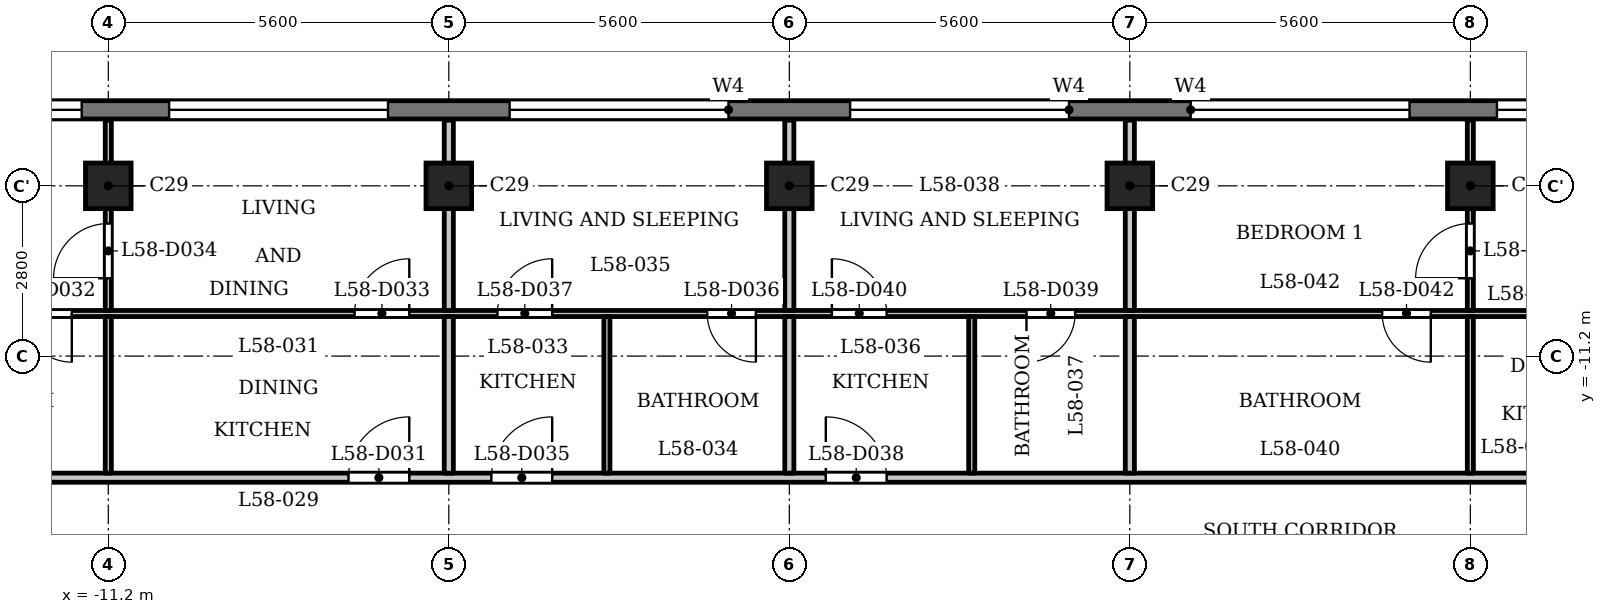
"""IFC4 building model, lengths in metres.
Left out: names, types, materials, properties, quantities, classifications, styles, units other than length and angle.
Written with IfcOpenShell. Run it as: python <this file> out.ifc"""

import sys

from ifc_helpers import new_model, si_unit, direction, frame, frame_2d, origin, origin_2d, place, context, subcontext, project, spatial, rectangle, extrude, element, fill, save


model = new_model("IFC4")
c1 = context("Model", 3, precision=1e-05, world=origin(), true_north=direction((0.0, 1.0)))
c2 = subcontext(c1, "Body", "Model", "MODEL_VIEW")
j1 = project(units=[si_unit("LENGTHUNIT", "METRE"), si_unit("PLANEANGLEUNIT", "RADIAN")], contexts=[c1])
p1 = place(None, origin())
s1 = spatial("IfcSite", under=j1, at=p1, CompositionType="ELEMENT")
p2 = place(p1, origin())
s2 = spatial("IfcBuilding", under=s1, at=p2, CompositionType="ELEMENT")
p3 = place(p2, frame((0.0, 0.0, 223.9)))
s3 = spatial("IfcBuildingStorey", under=s2, at=p3, CompositionType="ELEMENT", Elevation=223.9)
for number, where, z_axis, x_axis in (
    (1, (-11.2, -8.4, 0.0), (0.0, 0.0, 1.0), (1.0, 0.0, 0.0)),
    (2, (-5.6, -8.4, 0.0), (0.0, 0.0, 1.0), (1.0, 0.0, 0.0)),
    (3, (0.0, -8.4, 0.0), (0.0, 0.0, 1.0), (1.0, 0.0, 0.0)),
    (4, (5.6, -8.4, 0.0), (0.0, 0.0, 1.0), (1.0, 0.0, 0.0)),
    (5, (11.2, -8.4, 0.0), (0.0, 0.0, 1.0), (1.0, 0.0, 0.0)),
):
    element("IfcColumn", number, at=place(p3, frame(where, z_axis=z_axis, x_axis=x_axis)), inside=s3, PredefinedType="COLUMN", context=c2, shape_type="SweptSolid", body=[
        extrude(rectangle(XDim=0.75, YDim=0.75, at=origin_2d()), origin(), (0.0, 0.0, 1.0), 3.5),
    ])
p4 = place(p3, frame((13.8, -7.15, 0.0), z_axis=(0.0, 0.0, 1.0), x_axis=(-1.0, 0.0, 0.0)))
e6 = element("IfcWall", 6, at=p4, inside=s3, PredefinedType="SOLIDWALL", context=c2, shape_type="SweptSolid", body=[
    extrude(rectangle(XDim=27.6, YDim=0.3, at=frame_2d((13.8, 0.0))), origin(), (0.0, 0.0, 1.0), 3.2),
])
p5 = place(p4, frame((0.363, 0.0, 0.9)))
e7 = element("IfcOpeningElement", 7, at=p5, cuts=e6, PredefinedType="OPENING", context=c2, shape_type="SweptSolid", body=[
    extrude(rectangle(XDim=1.8, YDim=1.25, at=frame_2d((0.9, 0.625))), frame((0.0, 0.16, 0.0), z_axis=(0.0, -1.0, 0.0), x_axis=(1.0, 0.0, 0.0)), (0.0, 0.0, 1.0), 0.32),
])
p6 = place(p4, frame((3.6, 0.0, 1.2)))
e8 = element("IfcOpeningElement", 8, at=p6, cuts=e6, PredefinedType="OPENING", context=c2, shape_type="SweptSolid", body=[
    extrude(rectangle(XDim=3.6, YDim=0.95, at=frame_2d((1.8, 0.475))), frame((0.0, 0.16, 0.0), z_axis=(0.0, -1.0, 0.0), x_axis=(1.0, 0.0, 0.0)), (0.0, 0.0, 1.0), 0.32),
])
p7 = place(p4, frame((9.2, 0.0, 1.2)))
e9 = element("IfcOpeningElement", 9, at=p7, cuts=e6, PredefinedType="OPENING", context=c2, shape_type="SweptSolid", body=[
    extrude(rectangle(XDim=3.6, YDim=0.95, at=frame_2d((1.8, 0.475))), frame((0.0, 0.16, 0.0), z_axis=(0.0, -1.0, 0.0), x_axis=(1.0, 0.0, 0.0)), (0.0, 0.0, 1.0), 0.32),
])
p8 = place(p4, frame((14.8, 0.0, 1.2)))
e10 = element("IfcOpeningElement", 10, at=p8, cuts=e6, PredefinedType="OPENING", context=c2, shape_type="SweptSolid", body=[
    extrude(rectangle(XDim=3.6, YDim=0.95, at=frame_2d((1.8, 0.475))), frame((0.0, 0.16, 0.0), z_axis=(0.0, -1.0, 0.0), x_axis=(1.0, 0.0, 0.0)), (0.0, 0.0, 1.0), 0.32),
])
p9 = place(p4, frame((20.4, 0.0, 1.2)))
e11 = element("IfcOpeningElement", 11, at=p9, cuts=e6, PredefinedType="OPENING", context=c2, shape_type="SweptSolid", body=[
    extrude(rectangle(XDim=3.6, YDim=0.95, at=frame_2d((1.8, 0.475))), frame((0.0, 0.16, 0.0), z_axis=(0.0, -1.0, 0.0), x_axis=(1.0, 0.0, 0.0)), (0.0, 0.0, 1.0), 0.32),
])
p10 = place(p4, frame((25.438, 0.0, 0.9)))
e12 = element("IfcOpeningElement", 12, at=p10, cuts=e6, PredefinedType="OPENING", context=c2, shape_type="SweptSolid", body=[
    extrude(rectangle(XDim=1.8, YDim=1.25, at=frame_2d((0.9, 0.625))), frame((0.0, 0.16, 0.0), z_axis=(0.0, -1.0, 0.0), x_axis=(1.0, 0.0, 0.0)), (0.0, 0.0, 1.0), 0.32),
])
p11 = place(p3, frame((-17.4, -13.2, 0.0), z_axis=(0.0, 0.0, 1.0), x_axis=(1.0, 0.0, 0.0)))
e13 = element("IfcWall", 13, at=p11, inside=s3, PredefinedType="PARTITIONING", context=c2, shape_type="SweptSolid", body=[
    extrude(rectangle(XDim=34.8, YDim=0.15, at=frame_2d((17.4, 0.0))), origin(), (0.0, 0.0, 1.0), 3.2),
])
p12 = place(p11, frame((0.65, 0.0, 0.0)))
e14 = element("IfcOpeningElement", 14, at=p12, cuts=e13, PredefinedType="OPENING", context=c2, shape_type="SweptSolid", body=[
    extrude(rectangle(XDim=1.0, YDim=2.1, at=frame_2d((0.5, 1.05))), frame((0.0, 0.085, 0.0), z_axis=(0.0, -1.0, 0.0), x_axis=(1.0, 0.0, 0.0)), (0.0, 0.0, 1.0), 0.17),
])
p13 = place(p11, frame((33.05, 0.0, 0.0)))
e15 = element("IfcOpeningElement", 15, at=p13, cuts=e13, PredefinedType="OPENING", context=c2, shape_type="SweptSolid", body=[
    extrude(rectangle(XDim=1.0, YDim=2.1, at=frame_2d((0.5, 1.05))), frame((0.0, 0.085, 0.0), z_axis=(0.0, -1.0, 0.0), x_axis=(1.0, 0.0, 0.0)), (0.0, 0.0, 1.0), 0.17),
])
p14 = place(p11, frame((10.15, 0.0, 0.0)))
e16 = element("IfcOpeningElement", 16, at=p14, cuts=e13, PredefinedType="OPENING", context=c2, shape_type="SweptSolid", body=[
    extrude(rectangle(XDim=1.0, YDim=2.1, at=frame_2d((0.5, 1.05))), frame((0.0, 0.085, 0.0), z_axis=(0.0, -1.0, 0.0), x_axis=(1.0, 0.0, 0.0)), (0.0, 0.0, 1.0), 0.17),
])
p15 = place(p11, frame((12.5, 0.0, 0.0)))
e17 = element("IfcOpeningElement", 17, at=p15, cuts=e13, PredefinedType="OPENING", context=c2, shape_type="SweptSolid", body=[
    extrude(rectangle(XDim=1.0, YDim=2.1, at=frame_2d((0.5, 1.05))), frame((0.0, 0.085, 0.0), z_axis=(0.0, -1.0, 0.0), x_axis=(1.0, 0.0, 0.0)), (0.0, 0.0, 1.0), 0.17),
])
p16 = place(p11, frame((18.0, 0.0, 0.0)))
e18 = element("IfcOpeningElement", 18, at=p16, cuts=e13, PredefinedType="OPENING", context=c2, shape_type="SweptSolid", body=[
    extrude(rectangle(XDim=1.0, YDim=2.1, at=frame_2d((0.5, 1.05))), frame((0.0, 0.085, 0.0), z_axis=(0.0, -1.0, 0.0), x_axis=(1.0, 0.0, 0.0)), (0.0, 0.0, 1.0), 0.17),
])
p17 = place(p11, frame((30.75, 0.0, 0.0)))
e19 = element("IfcOpeningElement", 19, at=p17, cuts=e13, PredefinedType="OPENING", context=c2, shape_type="SweptSolid", body=[
    extrude(rectangle(XDim=1.0, YDim=2.1, at=frame_2d((0.5, 1.05))), frame((0.0, 0.085, 0.0), z_axis=(0.0, -1.0, 0.0), x_axis=(1.0, 0.0, 0.0)), (0.0, 0.0, 1.0), 0.17),
])
p18 = place(p3, frame((-14.925, -10.5, 0.0), z_axis=(0.0, 0.0, 1.0), x_axis=(1.0, 0.0, 0.0)))
e20 = element("IfcWall", 20, at=p18, inside=s3, PredefinedType="PARTITIONING", context=c2, shape_type="SweptSolid", body=[
    extrude(rectangle(XDim=29.85, YDim=0.1, at=frame_2d((14.925, 0.0))), origin(), (0.0, 0.0, 1.0), 3.2),
])
p19 = place(p18, frame((2.325, 0.0, 0.0)))
e21 = element("IfcOpeningElement", 21, at=p19, cuts=e20, PredefinedType="OPENING", context=c2, shape_type="SweptSolid", body=[
    extrude(rectangle(XDim=0.8, YDim=2.1, at=frame_2d((0.4, 1.05))), frame((0.0, 0.06, 0.0), z_axis=(0.0, -1.0, 0.0), x_axis=(1.0, 0.0, 0.0)), (0.0, 0.0, 1.0), 0.12),
])
p20 = place(p18, frame((7.775, 0.0, 0.0)))
e22 = element("IfcOpeningElement", 22, at=p20, cuts=e20, PredefinedType="OPENING", context=c2, shape_type="SweptSolid", body=[
    extrude(rectangle(XDim=0.9, YDim=2.1, at=frame_2d((0.45, 1.05))), frame((0.0, 0.06, 0.0), z_axis=(0.0, -1.0, 0.0), x_axis=(1.0, 0.0, 0.0)), (0.0, 0.0, 1.0), 0.12),
])
p21 = place(p18, frame((13.575, 0.0, 0.0)))
e23 = element("IfcOpeningElement", 23, at=p21, cuts=e20, PredefinedType="OPENING", context=c2, shape_type="SweptSolid", body=[
    extrude(rectangle(XDim=0.8, YDim=2.1, at=frame_2d((0.4, 1.05))), frame((0.0, 0.06, 0.0), z_axis=(0.0, -1.0, 0.0), x_axis=(1.0, 0.0, 0.0)), (0.0, 0.0, 1.0), 0.12),
])
p22 = place(p18, frame((10.125, 0.0, 0.0)))
e24 = element("IfcOpeningElement", 24, at=p22, cuts=e20, PredefinedType="OPENING", context=c2, shape_type="SweptSolid", body=[
    extrude(rectangle(XDim=0.9, YDim=2.1, at=frame_2d((0.45, 1.05))), frame((0.0, 0.06, 0.0), z_axis=(0.0, -1.0, 0.0), x_axis=(1.0, 0.0, 0.0)), (0.0, 0.0, 1.0), 0.12),
])
p23 = place(p18, frame((18.825, 0.0, 0.0)))
e25 = element("IfcOpeningElement", 25, at=p23, cuts=e20, PredefinedType="OPENING", context=c2, shape_type="SweptSolid", body=[
    extrude(rectangle(XDim=0.8, YDim=2.1, at=frame_2d((0.4, 1.05))), frame((0.0, 0.06, 0.0), z_axis=(0.0, -1.0, 0.0), x_axis=(1.0, 0.0, 0.0)), (0.0, 0.0, 1.0), 0.12),
])
p24 = place(p18, frame((15.625, 0.0, 0.0)))
e26 = element("IfcOpeningElement", 26, at=p24, cuts=e20, PredefinedType="OPENING", context=c2, shape_type="SweptSolid", body=[
    extrude(rectangle(XDim=0.9, YDim=2.1, at=frame_2d((0.45, 1.05))), frame((0.0, 0.06, 0.0), z_axis=(0.0, -1.0, 0.0), x_axis=(1.0, 0.0, 0.0)), (0.0, 0.0, 1.0), 0.12),
])
p25 = place(p18, frame((24.675, 0.0, 0.0)))
e27 = element("IfcOpeningElement", 27, at=p25, cuts=e20, PredefinedType="OPENING", context=c2, shape_type="SweptSolid", body=[
    extrude(rectangle(XDim=0.8, YDim=2.1, at=frame_2d((0.4, 1.05))), frame((0.0, 0.06, 0.0), z_axis=(0.0, -1.0, 0.0), x_axis=(1.0, 0.0, 0.0)), (0.0, 0.0, 1.0), 0.12),
])
p26 = place(p18, frame((28.375, 0.0, 0.0)))
e28 = element("IfcOpeningElement", 28, at=p26, cuts=e20, PredefinedType="OPENING", context=c2, shape_type="SweptSolid", body=[
    extrude(rectangle(XDim=0.9, YDim=2.1, at=frame_2d((0.45, 1.05))), frame((0.0, 0.06, 0.0), z_axis=(0.0, -1.0, 0.0), x_axis=(1.0, 0.0, 0.0)), (0.0, 0.0, 1.0), 0.12),
])
p27 = place(p3, frame((-11.2, -13.125, 0.0), z_axis=(0.0, 0.0, 1.0), x_axis=(0.0, 1.0, 0.0)))
e29 = element("IfcWall", 29, at=p27, inside=s3, PredefinedType="PARTITIONING", context=c2, shape_type="SweptSolid", body=[
    extrude(rectangle(XDim=2.575, YDim=0.1, at=frame_2d((1.288, 0.0))), origin(), (0.0, 0.0, 1.0), 3.2),
])
p28 = place(p3, frame((-11.2, -10.45, 0.0), z_axis=(0.0, 0.0, 1.0), x_axis=(0.0, 1.0, 0.0)))
e30 = element("IfcWall", 30, at=p28, inside=s3, PredefinedType="PARTITIONING", context=c2, shape_type="SweptSolid", body=[
    extrude(rectangle(XDim=3.13, YDim=0.1, at=frame_2d((1.565, 0.0))), origin(), (0.0, 0.0, 1.0), 3.2),
])
p29 = place(p28, frame((0.53, 0.0, 0.0)))
e31 = element("IfcOpeningElement", 31, at=p29, cuts=e30, PredefinedType="OPENING", context=c2, shape_type="SweptSolid", body=[
    extrude(rectangle(XDim=0.9, YDim=2.1, at=frame_2d((0.45, 1.05))), frame((0.0, 0.06, 0.0), z_axis=(0.0, -1.0, 0.0), x_axis=(1.0, 0.0, 0.0)), (0.0, 0.0, 1.0), 0.12),
])
p30 = place(p3, frame((-5.6, -13.125, 0.0), z_axis=(0.0, 0.0, 1.0), x_axis=(0.0, 1.0, 0.0)))
e32 = element("IfcWall", 32, at=p30, inside=s3, PredefinedType="PARTITIONING", context=c2, shape_type="SweptSolid", body=[
    extrude(rectangle(XDim=2.575, YDim=0.15, at=frame_2d((1.288, 0.0))), origin(), (0.0, 0.0, 1.0), 3.2),
])
p31 = place(p3, frame((-5.6, -10.45, 0.0), z_axis=(0.0, 0.0, 1.0), x_axis=(0.0, 1.0, 0.0)))
e33 = element("IfcWall", 33, at=p31, inside=s3, PredefinedType="PARTITIONING", context=c2, shape_type="SweptSolid", body=[
    extrude(rectangle(XDim=3.13, YDim=0.15, at=frame_2d((1.565, 0.0))), origin(), (0.0, 0.0, 1.0), 3.2),
])
p32 = place(p3, frame((-3.0, -13.125, 0.0), z_axis=(0.0, 0.0, 1.0), x_axis=(0.0, 1.0, 0.0)))
e34 = element("IfcWall", 34, at=p32, inside=s3, PredefinedType="PARTITIONING", context=c2, shape_type="SweptSolid", body=[
    extrude(rectangle(XDim=2.575, YDim=0.1, at=frame_2d((1.288, 0.0))), origin(), (0.0, 0.0, 1.0), 3.2),
])
p33 = place(p3, frame((0.0, -13.125, 0.0), z_axis=(0.0, 0.0, 1.0), x_axis=(0.0, 1.0, 0.0)))
e35 = element("IfcWall", 35, at=p33, inside=s3, PredefinedType="PARTITIONING", context=c2, shape_type="SweptSolid", body=[
    extrude(rectangle(XDim=2.575, YDim=0.15, at=frame_2d((1.288, 0.0))), origin(), (0.0, 0.0, 1.0), 3.2),
])
p34 = place(p3, frame((0.0, -10.45, 0.0), z_axis=(0.0, 0.0, 1.0), x_axis=(0.0, 1.0, 0.0)))
e36 = element("IfcWall", 36, at=p34, inside=s3, PredefinedType="PARTITIONING", context=c2, shape_type="SweptSolid", body=[
    extrude(rectangle(XDim=3.13, YDim=0.15, at=frame_2d((1.565, 0.0))), origin(), (0.0, 0.0, 1.0), 3.2),
])
p35 = place(p3, frame((3.0, -13.125, 0.0), z_axis=(0.0, 0.0, 1.0), x_axis=(0.0, 1.0, 0.0)))
e37 = element("IfcWall", 37, at=p35, inside=s3, PredefinedType="PARTITIONING", context=c2, shape_type="SweptSolid", body=[
    extrude(rectangle(XDim=2.575, YDim=0.1, at=frame_2d((1.288, 0.0))), origin(), (0.0, 0.0, 1.0), 3.2),
])
p36 = place(p3, frame((5.6, -13.125, 0.0), z_axis=(0.0, 0.0, 1.0), x_axis=(0.0, 1.0, 0.0)))
e38 = element("IfcWall", 38, at=p36, inside=s3, PredefinedType="PARTITIONING", context=c2, shape_type="SweptSolid", body=[
    extrude(rectangle(XDim=2.575, YDim=0.15, at=frame_2d((1.288, 0.0))), origin(), (0.0, 0.0, 1.0), 3.2),
])
p37 = place(p3, frame((5.6, -10.45, 0.0), z_axis=(0.0, 0.0, 1.0), x_axis=(0.0, 1.0, 0.0)))
e39 = element("IfcWall", 39, at=p37, inside=s3, PredefinedType="PARTITIONING", context=c2, shape_type="SweptSolid", body=[
    extrude(rectangle(XDim=3.13, YDim=0.15, at=frame_2d((1.565, 0.0))), origin(), (0.0, 0.0, 1.0), 3.2),
])
p38 = place(p3, frame((11.2, -13.125, 0.0), z_axis=(0.0, 0.0, 1.0), x_axis=(0.0, 1.0, 0.0)))
e40 = element("IfcWall", 40, at=p38, inside=s3, PredefinedType="PARTITIONING", context=c2, shape_type="SweptSolid", body=[
    extrude(rectangle(XDim=2.575, YDim=0.1, at=frame_2d((1.288, 0.0))), origin(), (0.0, 0.0, 1.0), 3.2),
])
p39 = place(p3, frame((11.2, -10.45, 0.0), z_axis=(0.0, 0.0, 1.0), x_axis=(0.0, 1.0, 0.0)))
e41 = element("IfcWall", 41, at=p39, inside=s3, PredefinedType="PARTITIONING", context=c2, shape_type="SweptSolid", body=[
    extrude(rectangle(XDim=3.13, YDim=0.1, at=frame_2d((1.565, 0.0))), origin(), (0.0, 0.0, 1.0), 3.2),
])
p40 = place(p39, frame((0.53, 0.0, 0.0)))
e42 = element("IfcOpeningElement", 42, at=p40, cuts=e41, PredefinedType="OPENING", context=c2, shape_type="SweptSolid", body=[
    extrude(rectangle(XDim=0.9, YDim=2.1, at=frame_2d((0.45, 1.05))), frame((0.0, 0.06, 0.0), z_axis=(0.0, -1.0, 0.0), x_axis=(1.0, 0.0, 0.0)), (0.0, 0.0, 1.0), 0.12),
])
p41 = place(p14, origin())
e43 = element("IfcDoor", 43, at=p41, inside=s3, OperationType="SINGLE_SWING_LEFT", PredefinedType="DOOR", context=c2, shape_type="SweptSolid", body=[
    extrude(rectangle(XDim=1.0, YDim=2.1, at=frame_2d((0.5, 1.05))), frame((0.0, 0.025, 0.0), z_axis=(0.0, -1.0, 0.0), x_axis=(1.0, 0.0, 0.0)), (0.0, 0.0, 1.0), 0.05),
])
fill(e16, e43)
p42 = place(p19, origin())
e44 = element("IfcDoor", 44, at=p42, inside=s3, OperationType="SINGLE_SWING_RIGHT", PredefinedType="DOOR", context=c2, shape_type="SweptSolid", body=[
    extrude(rectangle(XDim=0.8, YDim=2.1, at=frame_2d((0.4, 1.05))), frame((0.0, 0.025, 0.0), z_axis=(0.0, -1.0, 0.0), x_axis=(1.0, 0.0, 0.0)), (0.0, 0.0, 1.0), 0.05),
])
fill(e21, e44)
p43 = place(p20, origin())
e45 = element("IfcDoor", 45, at=p43, inside=s3, OperationType="SINGLE_SWING_LEFT", PredefinedType="DOOR", context=c2, shape_type="SweptSolid", body=[
    extrude(rectangle(XDim=0.9, YDim=2.1, at=frame_2d((0.45, 1.05))), frame((0.0, 0.025, 0.0), z_axis=(0.0, -1.0, 0.0), x_axis=(1.0, 0.0, 0.0)), (0.0, 0.0, 1.0), 0.05),
])
fill(e22, e45)
p44 = place(p29, origin())
e46 = element("IfcDoor", 46, at=p44, inside=s3, OperationType="SINGLE_SWING_RIGHT", PredefinedType="DOOR", context=c2, shape_type="SweptSolid", body=[
    extrude(rectangle(XDim=0.9, YDim=2.1, at=frame_2d((0.45, 1.05))), frame((0.0, 0.025, 0.0), z_axis=(0.0, -1.0, 0.0), x_axis=(1.0, 0.0, 0.0)), (0.0, 0.0, 1.0), 0.05),
])
fill(e31, e46)
p45 = place(p15, origin())
e47 = element("IfcDoor", 47, at=p45, inside=s3, OperationType="SINGLE_SWING_LEFT", PredefinedType="DOOR", context=c2, shape_type="SweptSolid", body=[
    extrude(rectangle(XDim=1.0, YDim=2.1, at=frame_2d((0.5, 1.05))), frame((0.0, 0.025, 0.0), z_axis=(0.0, -1.0, 0.0), x_axis=(1.0, 0.0, 0.0)), (0.0, 0.0, 1.0), 0.05),
])
fill(e17, e47)
p46 = place(p21, origin())
e48 = element("IfcDoor", 48, at=p46, inside=s3, OperationType="SINGLE_SWING_RIGHT", PredefinedType="DOOR", context=c2, shape_type="SweptSolid", body=[
    extrude(rectangle(XDim=0.8, YDim=2.1, at=frame_2d((0.4, 1.05))), frame((0.0, 0.025, 0.0), z_axis=(0.0, -1.0, 0.0), x_axis=(1.0, 0.0, 0.0)), (0.0, 0.0, 1.0), 0.05),
])
fill(e23, e48)
p47 = place(p22, origin())
e49 = element("IfcDoor", 49, at=p47, inside=s3, OperationType="SINGLE_SWING_LEFT", PredefinedType="DOOR", context=c2, shape_type="SweptSolid", body=[
    extrude(rectangle(XDim=0.9, YDim=2.1, at=frame_2d((0.45, 1.05))), frame((0.0, 0.025, 0.0), z_axis=(0.0, -1.0, 0.0), x_axis=(1.0, 0.0, 0.0)), (0.0, 0.0, 1.0), 0.05),
])
fill(e24, e49)
p48 = place(p16, origin())
e50 = element("IfcDoor", 50, at=p48, inside=s3, OperationType="SINGLE_SWING_RIGHT", PredefinedType="DOOR", context=c2, shape_type="SweptSolid", body=[
    extrude(rectangle(XDim=1.0, YDim=2.1, at=frame_2d((0.5, 1.05))), frame((0.0, 0.025, 0.0), z_axis=(0.0, -1.0, 0.0), x_axis=(1.0, 0.0, 0.0)), (0.0, 0.0, 1.0), 0.05),
])
fill(e18, e50)
p49 = place(p23, origin())
e51 = element("IfcDoor", 51, at=p49, inside=s3, OperationType="SINGLE_SWING_LEFT", PredefinedType="DOOR", context=c2, shape_type="SweptSolid", body=[
    extrude(rectangle(XDim=0.8, YDim=2.1, at=frame_2d((0.4, 1.05))), frame((0.0, 0.025, 0.0), z_axis=(0.0, -1.0, 0.0), x_axis=(1.0, 0.0, 0.0)), (0.0, 0.0, 1.0), 0.05),
])
fill(e25, e51)
p50 = place(p24, origin())
e52 = element("IfcDoor", 52, at=p50, inside=s3, OperationType="SINGLE_SWING_RIGHT", PredefinedType="DOOR", context=c2, shape_type="SweptSolid", body=[
    extrude(rectangle(XDim=0.9, YDim=2.1, at=frame_2d((0.45, 1.05))), frame((0.0, 0.025, 0.0), z_axis=(0.0, -1.0, 0.0), x_axis=(1.0, 0.0, 0.0)), (0.0, 0.0, 1.0), 0.05),
])
fill(e26, e52)
p51 = place(p25, origin())
e53 = element("IfcDoor", 53, at=p51, inside=s3, OperationType="SINGLE_SWING_RIGHT", PredefinedType="DOOR", context=c2, shape_type="SweptSolid", body=[
    extrude(rectangle(XDim=0.8, YDim=2.1, at=frame_2d((0.4, 1.05))), frame((0.0, 0.025, 0.0), z_axis=(0.0, -1.0, 0.0), x_axis=(1.0, 0.0, 0.0)), (0.0, 0.0, 1.0), 0.05),
])
fill(e27, e53)
p52 = place(p40, origin())
e54 = element("IfcDoor", 54, at=p52, inside=s3, OperationType="SINGLE_SWING_RIGHT", PredefinedType="DOOR", context=c2, shape_type="SweptSolid", body=[
    extrude(rectangle(XDim=0.9, YDim=2.1, at=frame_2d((0.45, 1.05))), frame((0.0, 0.025, 0.0), z_axis=(0.0, -1.0, 0.0), x_axis=(1.0, 0.0, 0.0)), (0.0, 0.0, 1.0), 0.05),
])
fill(e42, e54)
p53 = place(p5, origin())
e55 = element("IfcWindow", 55, at=p53, inside=s3, PartitioningType="SINGLE_PANEL", PredefinedType="WINDOW", context=c2, shape_type="SweptSolid", body=[
    extrude(rectangle(XDim=1.8, YDim=1.25, at=frame_2d((0.9, 0.625))), frame((0.0, 0.03, 0.0), z_axis=(0.0, -1.0, 0.0), x_axis=(1.0, 0.0, 0.0)), (0.0, 0.0, 1.0), 0.06),
])
fill(e7, e55)
p54 = place(p6, origin())
e56 = element("IfcWindow", 56, at=p54, inside=s3, PartitioningType="SINGLE_PANEL", PredefinedType="WINDOW", context=c2, shape_type="SweptSolid", body=[
    extrude(rectangle(XDim=3.6, YDim=0.95, at=frame_2d((1.8, 0.475))), frame((0.0, 0.03, 0.0), z_axis=(0.0, -1.0, 0.0), x_axis=(1.0, 0.0, 0.0)), (0.0, 0.0, 1.0), 0.06),
])
fill(e8, e56)
p55 = place(p7, origin())
e57 = element("IfcWindow", 57, at=p55, inside=s3, PartitioningType="SINGLE_PANEL", PredefinedType="WINDOW", context=c2, shape_type="SweptSolid", body=[
    extrude(rectangle(XDim=3.6, YDim=0.95, at=frame_2d((1.8, 0.475))), frame((0.0, 0.03, 0.0), z_axis=(0.0, -1.0, 0.0), x_axis=(1.0, 0.0, 0.0)), (0.0, 0.0, 1.0), 0.06),
])
fill(e9, e57)
p56 = place(p8, origin())
e58 = element("IfcWindow", 58, at=p56, inside=s3, PartitioningType="SINGLE_PANEL", PredefinedType="WINDOW", context=c2, shape_type="SweptSolid", body=[
    extrude(rectangle(XDim=3.6, YDim=0.95, at=frame_2d((1.8, 0.475))), frame((0.0, 0.03, 0.0), z_axis=(0.0, -1.0, 0.0), x_axis=(1.0, 0.0, 0.0)), (0.0, 0.0, 1.0), 0.06),
])
fill(e10, e58)
p57 = place(p9, origin())
e59 = element("IfcWindow", 59, at=p57, inside=s3, PartitioningType="SINGLE_PANEL", PredefinedType="WINDOW", context=c2, shape_type="SweptSolid", body=[
    extrude(rectangle(XDim=3.6, YDim=0.95, at=frame_2d((1.8, 0.475))), frame((0.0, 0.03, 0.0), z_axis=(0.0, -1.0, 0.0), x_axis=(1.0, 0.0, 0.0)), (0.0, 0.0, 1.0), 0.06),
])
fill(e11, e59)
p58 = place(p10, origin())
e60 = element("IfcWindow", 60, at=p58, inside=s3, PartitioningType="SINGLE_PANEL", PredefinedType="WINDOW", context=c2, shape_type="SweptSolid", body=[
    extrude(rectangle(XDim=1.8, YDim=1.25, at=frame_2d((0.9, 0.625))), frame((0.0, 0.03, 0.0), z_axis=(0.0, -1.0, 0.0), x_axis=(1.0, 0.0, 0.0)), (0.0, 0.0, 1.0), 0.06),
])
fill(e12, e60)
save(model, sys.argv[1])
